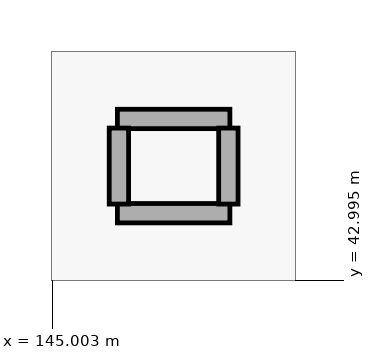
"""IFC4 building model, lengths in metres.
Left out: names, types, materials, properties, quantities, classifications, styles, units other than length and angle.
Written with IfcOpenShell. Run it as: python <this file> out.ifc"""

import sys

from ifc_helpers import new_model, si_unit, direction, frame, frame_2d, origin, place, context, subcontext, project, spatial, rectangle, extrude, element, save


model = new_model("IFC4")
c1 = context("Model", 3, precision=1e-05, world=origin(), true_north=direction((0.0, 1.0)))
c2 = subcontext(c1, "Body", "Model", "MODEL_VIEW")
j1 = project(units=[si_unit("LENGTHUNIT", "METRE"), si_unit("PLANEANGLEUNIT", "RADIAN")], contexts=[c1])
p1 = place(None, origin())
s1 = spatial("IfcSite", under=j1, at=p1, CompositionType="ELEMENT")
p2 = place(p1, origin())
s2 = spatial("IfcBuilding", under=s1, at=p2, CompositionType="ELEMENT")
p3 = place(p2, origin())
s3 = spatial("IfcBuildingStorey", under=s2, at=p3, CompositionType="ELEMENT", Elevation=0.0)
for number, where, z_axis, x_axis in (
    (1, (145.86, 45.12, 0.0), (0.0, 0.0, 1.0), (1.0, 0.0, 0.0)),
    (2, (145.86, 43.88, 0.0), (0.0, 0.0, 1.0), (1.0, 0.0, 0.0)),
):
    element("IfcWall", number, at=place(p3, frame(where, z_axis=z_axis, x_axis=x_axis)), inside=s3, PredefinedType="PARTITIONING", context=c2, shape_type="SweptSolid", body=[
        extrude(rectangle(XDim=1.48, YDim=0.255, at=frame_2d((0.74, 0.0))), origin(), (0.0, 0.0, 1.0), 5.04),
    ])
for number, where, z_axis, x_axis in (
    (3, (145.88, 44.0, 0.0), (0.0, 0.0, 1.0), (0.0, 1.0, 0.0)),
    (4, (147.32, 44.0, 0.0), (0.0, 0.0, 1.0), (0.0, 1.0, 0.0)),
):
    element("IfcWall", number, at=place(p3, frame(where, z_axis=z_axis, x_axis=x_axis)), inside=s3, PredefinedType="PARTITIONING", context=c2, shape_type="SweptSolid", body=[
        extrude(rectangle(XDim=1.0, YDim=0.255, at=frame_2d((0.5, 0.0))), origin(), (0.0, 0.0, 1.0), 5.04),
    ])
save(model, sys.argv[1])
